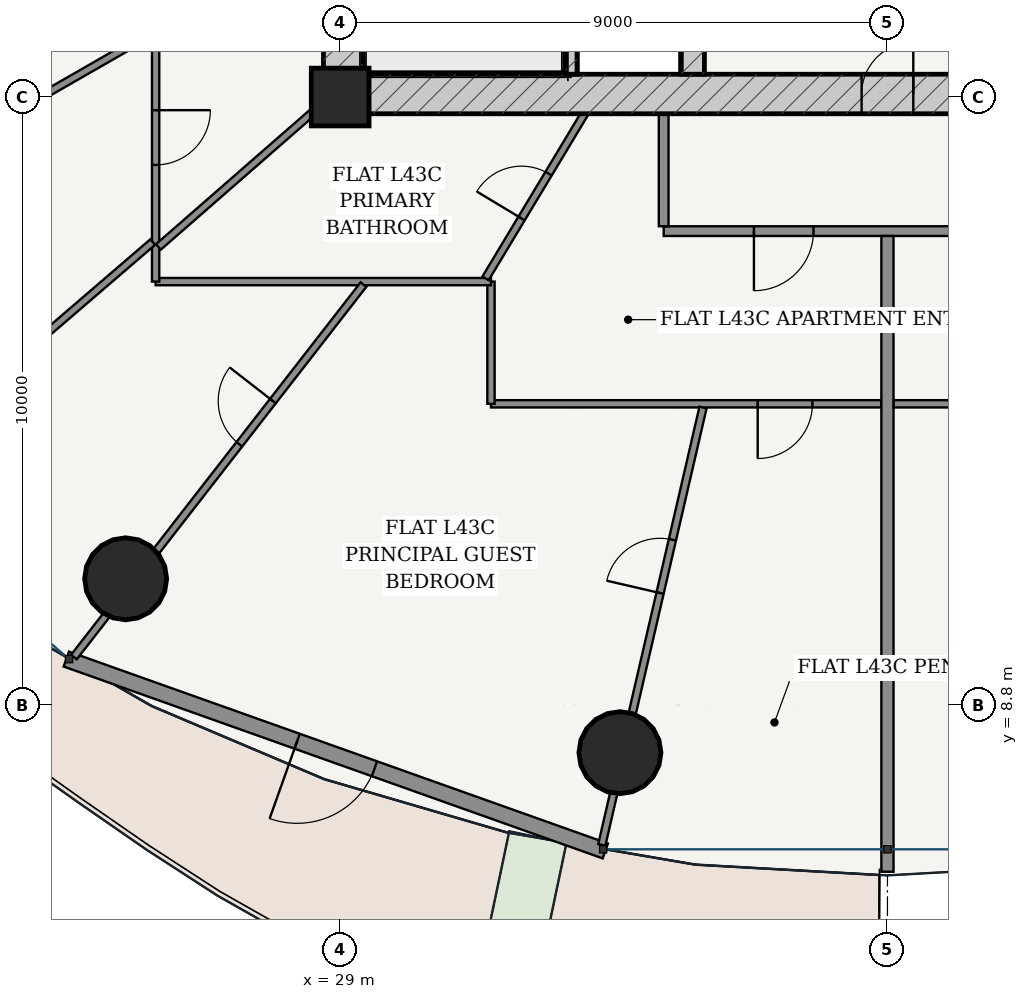
"""IFC4 building model, lengths in metres.
Left out: names, types, materials, properties, quantities, classifications, styles, units other than length and angle.
Written with IfcOpenShell. Run it as: python <this file> out.ifc"""

import sys

from ifc_helpers import new_model, si_unit, direction, frame, frame_2d, origin, origin_2d, place, context, subcontext, project, spatial, rectangle, hollow_circle, extrude, source, transform, mapped, element, fill, save


model = new_model("IFC4")
c1 = context("Model", 3, precision=1e-05, world=origin(), true_north=direction((-0.2419218956, 0.970295726276)))
c2 = subcontext(c1, "Body", "Model", "MODEL_VIEW")
j1 = project(units=[si_unit("LENGTHUNIT", "METRE"), si_unit("PLANEANGLEUNIT", "RADIAN")], contexts=[c1])
p1 = place(None, origin())
s1 = spatial("IfcSite", under=j1, at=p1, CompositionType="ELEMENT")
p2 = place(p1, origin())
s2 = spatial("IfcBuilding", under=s1, at=p2, CompositionType="ELEMENT")
p3 = place(p2, frame((0.0, 0.0, 164.2)))
s3 = spatial("IfcBuildingStorey", under=s2, at=p3, CompositionType="ELEMENT", Elevation=164.2)
p4 = place(p3, frame((29.0, 18.8, 0.0), z_axis=(0.0, 0.0, 1.0), x_axis=(1.0, 0.0, 0.0)))
e1 = element("IfcColumn", 1, at=p4, inside=s3, PredefinedType="COLUMN", context=c2, shape_type="SweptSolid", body=[
    extrude(rectangle(XDim=0.95, YDim=0.95, at=origin_2d()), origin(), (0.0, 0.0, 1.0), 3.6),
])
p5 = place(p3, frame((28.725, 18.85, 0.0), z_axis=(0.0, 0.0, 1.0), x_axis=(1.0, 0.0, 0.0)))
e2 = element("IfcWall", 2, at=p5, inside=s3, PredefinedType="SHEAR", context=c2, shape_type="SweptSolid", body=[
    extrude(rectangle(XDim=18.55, YDim=0.65, at=frame_2d((9.275, 0.0))), origin(), (0.0, 0.0, 1.0), 3.33),
])
p6 = place(p5, frame((8.85, 0.0, 0.0)))
e3 = element("IfcOpeningElement", 3, at=p6, cuts=e2, PredefinedType="OPENING", context=c2, shape_type="SweptSolid", body=[
    extrude(rectangle(XDim=0.85, YDim=2.1, at=frame_2d((0.425, 1.05))), frame((0.0, 0.335, 0.0), z_axis=(0.0, -1.0, 0.0), x_axis=(1.0, 0.0, 0.0)), (0.0, 0.0, 1.0), 0.67),
])
p7 = place(p3, frame((29.05, 19.175, 0.0), z_axis=(0.0, 0.0, 1.0), x_axis=(0.0, 1.0, 0.0)))
e4 = element("IfcWall", 4, at=p7, inside=s3, PredefinedType="SHEAR", context=c2, shape_type="SweptSolid", body=[
    extrude(rectangle(XDim=15.25, YDim=0.65, at=frame_2d((7.625, 0.0))), origin(), (0.0, 0.0, 1.0), 3.33),
])
p8 = place(p7, frame((9.875, 0.0, 0.0)))
e5 = element("IfcOpeningElement", 5, at=p8, cuts=e4, PredefinedType="OPENING", context=c2, shape_type="SweptSolid", body=[
    extrude(rectangle(XDim=1.5, YDim=2.2, at=frame_2d((0.75, 1.1))), frame((0.0, 0.335, 0.0), z_axis=(0.0, -1.0, 0.0), x_axis=(1.0, 0.0, 0.0)), (0.0, 0.0, 1.0), 0.67),
])
p9 = place(p3, frame((32.795, 19.175, 0.0), z_axis=(0.0, 0.0, 1.0), x_axis=(0.0, 1.0, 0.0)))
e6 = element("IfcWall", 6, at=p9, inside=s3, PredefinedType="SOLIDWALL", context=c2, shape_type="SweptSolid", body=[
    extrude(rectangle(XDim=7.375, YDim=0.2, at=frame_2d((3.688, 0.0))), origin(), (0.0, 0.0, 1.0), 3.33),
])
p10 = place(p3, frame((34.8, 19.175, 0.0), z_axis=(0.0, 0.0, 1.0), x_axis=(0.0, 1.0, 0.0)))
e7 = element("IfcWall", 7, at=p10, inside=s3, PredefinedType="SHEAR", context=c2, shape_type="SweptSolid", body=[
    extrude(rectangle(XDim=15.25, YDim=0.38, at=frame_2d((7.625, 0.0))), origin(), (0.0, 0.0, 1.0), 3.33),
])
p11 = place(p10, frame((7.8, 0.0, 0.0)))
e8 = element("IfcOpeningElement", 8, at=p11, cuts=e7, PredefinedType="OPENING", context=c2, shape_type="SweptSolid", body=[
    extrude(rectangle(XDim=1.05, YDim=2.15, at=frame_2d((0.525, 1.075))), frame((0.0, 0.2, 0.0), z_axis=(0.0, -1.0, 0.0), x_axis=(1.0, 0.0, 0.0)), (0.0, 0.0, 1.0), 0.4),
])
for number, where, z_axis, x_axis in (
    (9, (25.472, 10.877, 0.0), (0.0, 0.0, 1.0), (1.0, 0.0, 0.0)),
    (10, (33.601, 8.018, 0.0), (0.0, 0.0, 1.0), (1.0, 0.0, 0.0)),
):
    element("IfcColumn", number, at=place(p3, frame(where, z_axis=z_axis, x_axis=x_axis)), inside=s3, PredefinedType="COLUMN", context=c2, shape_type="SweptSolid", body=[
        extrude(hollow_circle(Radius=0.675, WallThickness=0.042, at=origin_2d()), origin(), (0.0, 0.0, 1.0), 3.6),
    ])
p12 = place(p3, frame((24.497, 9.557, 0.0), z_axis=(0.0, 0.0, 1.0), x_axis=(0.942103604331, -0.335321932934, 0.0)))
e11 = element("IfcWall", 11, at=p12, inside=s3, PredefinedType="SOLIDWALL", context=c2, shape_type="SweptSolid", body=[
    extrude(rectangle(XDim=9.408, YDim=0.26, at=frame_2d((4.704, 0.0))), origin(), (0.0, 0.0, 1.0), 3.33),
])
p13 = place(p12, frame((4.029, 0.0, 0.0)))
e12 = element("IfcOpeningElement", 12, at=p13, cuts=e11, PredefinedType="OPENING", context=c2, shape_type="SweptSolid", body=[
    extrude(rectangle(XDim=1.35, YDim=2.2, at=frame_2d((0.675, 1.1))), frame((0.0, 0.14, 0.0), z_axis=(0.0, -1.0, 0.0), x_axis=(1.0, 0.0, 0.0)), (0.0, 0.0, 1.0), 0.28),
])
p14 = place(p3, frame((34.32, 16.595, 0.0), z_axis=(0.0, 0.0, 1.0), x_axis=(1.0, 0.0, 0.0)))
e13 = element("IfcWall", 13, at=p14, inside=s3, PredefinedType="PARTITIONING", context=c2, shape_type="SweptSolid", body=[
    extrude(rectangle(XDim=14.885, YDim=0.16, at=frame_2d((7.442, 0.0))), origin(), (0.0, 0.0, 1.0), 2.776),
])
p15 = place(p14, frame((1.484, 0.0, 0.0)))
e14 = element("IfcOpeningElement", 14, at=p15, cuts=e13, PredefinedType="OPENING", context=c2, shape_type="SweptSolid", body=[
    extrude(rectangle(XDim=0.98, YDim=2.2, at=frame_2d((0.49, 1.1))), frame((0.0, 0.09, 0.0), z_axis=(0.0, -1.0, 0.0), x_axis=(1.0, 0.0, 0.0)), (0.0, 0.0, 1.0), 0.18),
])
p16 = place(p14, frame((10.741, 0.0, 0.0)))
e15 = element("IfcOpeningElement", 15, at=p16, cuts=e13, PredefinedType="OPENING", context=c2, shape_type="SweptSolid", body=[
    extrude(rectangle(XDim=0.98, YDim=2.2, at=frame_2d((0.49, 1.1))), frame((0.0, 0.09, 0.0), z_axis=(0.0, -1.0, 0.0), x_axis=(1.0, 0.0, 0.0)), (0.0, 0.0, 1.0), 0.18),
])
p17 = place(p3, frame((34.32, 16.675, 0.0), z_axis=(0.0, 0.0, 1.0), x_axis=(0.0, 1.0, 0.0)))
e16 = element("IfcWall", 16, at=p17, inside=s3, PredefinedType="PARTITIONING", context=c2, shape_type="SweptSolid", body=[
    extrude(rectangle(XDim=1.85, YDim=0.16, at=frame_2d((0.925, 0.0))), origin(), (0.0, 0.0, 1.0), 3.33),
])
p18 = place(p3, frame((37.898, 13.755, 0.0), z_axis=(0.0, 0.0, 1.0), x_axis=(-1.0, 0.0, 0.0)))
e17 = element("IfcWall", 17, at=p18, inside=s3, PredefinedType="PARTITIONING", context=c2, shape_type="SweptSolid", body=[
    extrude(rectangle(XDim=6.418, YDim=0.12, at=frame_2d((3.209, 0.0))), origin(), (0.0, 0.0, 1.0), 2.776),
])
p19 = place(p18, frame((1.132, 0.0, 0.0)))
e18 = element("IfcOpeningElement", 18, at=p19, cuts=e17, PredefinedType="OPENING", context=c2, shape_type="SweptSolid", body=[
    extrude(rectangle(XDim=0.9, YDim=2.15, at=frame_2d((0.45, 1.075))), frame((0.0, 0.07, 0.0), z_axis=(0.0, -1.0, 0.0), x_axis=(1.0, 0.0, 0.0)), (0.0, 0.0, 1.0), 0.14),
])
p20 = place(p3, frame((31.48, 13.755, 0.0), z_axis=(0.0, 0.0, 1.0), x_axis=(0.0, 1.0, 0.0)))
e19 = element("IfcWall", 19, at=p20, inside=s3, PredefinedType="PARTITIONING", context=c2, shape_type="SweptSolid", body=[
    extrude(rectangle(XDim=2.01, YDim=0.12, at=frame_2d((1.005, 0.0))), origin(), (0.0, 0.0, 1.0), 3.005),
])
p21 = place(p3, frame((31.48, 15.765, 0.0), z_axis=(0.0, 0.0, 1.0), x_axis=(-1.0, 0.0, 0.0)))
e20 = element("IfcWall", 20, at=p21, inside=s3, PredefinedType="PARTITIONING", context=c2, shape_type="SweptSolid", body=[
    extrude(rectangle(XDim=5.515, YDim=0.12, at=frame_2d((2.757, 0.0))), origin(), (0.0, 0.0, 1.0), 2.776),
])
p22 = place(p3, frame((25.965, 15.765, 0.0), z_axis=(0.0, 0.0, 1.0), x_axis=(0.0, 1.0, 0.0)))
e21 = element("IfcWall", 21, at=p22, inside=s3, PredefinedType="PARTITIONING", context=c2, shape_type="SweptSolid", body=[
    extrude(rectangle(XDim=5.715, YDim=0.12, at=frame_2d((2.857, 0.0))), origin(), (0.0, 0.0, 1.0), 2.776),
])
p23 = place(p22, frame((1.919, 0.0, 0.0)))
e22 = element("IfcOpeningElement", 22, at=p23, cuts=e21, PredefinedType="OPENING", context=c2, shape_type="SweptSolid", body=[
    extrude(rectangle(XDim=0.9, YDim=2.15, at=frame_2d((0.45, 1.075))), frame((0.0, 0.07, 0.0), z_axis=(0.0, -1.0, 0.0), x_axis=(1.0, 0.0, 0.0)), (0.0, 0.0, 1.0), 0.14),
])
p24 = place(p3, frame((25.911, 19.857, 0.0), z_axis=(0.0, 0.0, 1.0), x_axis=(-0.867160939672, -0.498028015986, 0.0)))
e23 = element("IfcWall", 23, at=p24, inside=s3, PredefinedType="PARTITIONING", context=c2, shape_type="SweptSolid", body=[
    extrude(rectangle(XDim=9.152, YDim=0.12, at=frame_2d((4.576, 0.0))), origin(), (0.0, 0.0, 1.0), 2.776),
])
p25 = place(p24, frame((3.124, 0.0, 0.0)))
e24 = element("IfcOpeningElement", 24, at=p25, cuts=e23, PredefinedType="OPENING", context=c2, shape_type="SweptSolid", body=[
    extrude(rectangle(XDim=0.9, YDim=2.15, at=frame_2d((0.45, 1.075))), frame((0.0, 0.07, 0.0), z_axis=(0.0, -1.0, 0.0), x_axis=(1.0, 0.0, 0.0)), (0.0, 0.0, 1.0), 0.14),
])
p26 = place(p3, frame((25.918, 16.416, 0.0), z_axis=(0.0, 0.0, 1.0), x_axis=(-0.758356041353, -0.651840559142, 0.0)))
e25 = element("IfcWall", 25, at=p26, inside=s3, PredefinedType="PARTITIONING", context=c2, shape_type="SweptSolid", body=[
    extrude(rectangle(XDim=6.569, YDim=0.12, at=frame_2d((3.285, 0.0))), origin(), (0.0, 0.0, 1.0), 2.846),
])
p27 = place(p26, frame((2.834, 0.0, 0.0)))
e26 = element("IfcOpeningElement", 26, at=p27, cuts=e25, PredefinedType="OPENING", context=c2, shape_type="SweptSolid", body=[
    extrude(rectangle(XDim=0.9, YDim=2.15, at=frame_2d((0.45, 1.075))), frame((0.0, 0.07, 0.0), z_axis=(0.0, -1.0, 0.0), x_axis=(1.0, 0.0, 0.0)), (0.0, 0.0, 1.0), 0.14),
])
p28 = place(p3, frame((29.383, 15.716, 0.0), z_axis=(0.0, 0.0, 1.0), x_axis=(-0.613751061882, -0.789499609904, 0.0)))
e27 = element("IfcWall", 27, at=p28, inside=s3, PredefinedType="PARTITIONING", context=c2, shape_type="SweptSolid", body=[
    extrude(rectangle(XDim=7.758, YDim=0.12, at=frame_2d((3.879, 0.0))), origin(), (0.0, 0.0, 1.0), 2.776),
])
p29 = place(p28, frame((2.426, 0.0, 0.0)))
e28 = element("IfcOpeningElement", 28, at=p29, cuts=e27, PredefinedType="OPENING", context=c2, shape_type="SweptSolid", body=[
    extrude(rectangle(XDim=0.9, YDim=2.15, at=frame_2d((0.45, 1.075))), frame((0.0, 0.07, 0.0), z_axis=(0.0, -1.0, 0.0), x_axis=(1.0, 0.0, 0.0)), (0.0, 0.0, 1.0), 0.14),
])
p30 = place(p3, frame((34.967, 13.695, 0.0), z_axis=(0.0, 0.0, 1.0), x_axis=(-0.225458405801, -0.974252794327, 0.0)))
e29 = element("IfcWall", 29, at=p30, inside=s3, PredefinedType="PARTITIONING", context=c2, shape_type="SweptSolid", body=[
    extrude(rectangle(XDim=7.383, YDim=0.12, at=frame_2d((3.691, 0.0))), origin(), (0.0, 0.0, 1.0), 2.776),
])
p31 = place(p30, frame((2.232, 0.0, 0.0)))
e30 = element("IfcOpeningElement", 30, at=p31, cuts=e29, PredefinedType="OPENING", context=c2, shape_type="SweptSolid", body=[
    extrude(rectangle(XDim=0.9, YDim=2.15, at=frame_2d((0.45, 1.075))), frame((0.0, 0.07, 0.0), z_axis=(0.0, -1.0, 0.0), x_axis=(1.0, 0.0, 0.0)), (0.0, 0.0, 1.0), 0.14),
])
p32 = place(p3, frame((28.588, 18.585, 0.0), z_axis=(0.0, 0.0, 1.0), x_axis=(-0.753380933673, -0.657584343471, 0.0)))
e31 = element("IfcWall", 31, at=p32, inside=s3, PredefinedType="PARTITIONING", context=c2, shape_type="SweptSolid", body=[
    extrude(rectangle(XDim=3.42, YDim=0.12, at=frame_2d((1.71, 0.0))), origin(), (0.0, 0.0, 1.0), 3.005),
])
p33 = place(p3, frame((33.02, 18.525, 0.0), z_axis=(0.0, 0.0, 1.0), x_axis=(-0.515677168, -0.856782970421, 0.0)))
e32 = element("IfcWall", 32, at=p33, inside=s3, PredefinedType="PARTITIONING", context=c2, shape_type="SweptSolid", body=[
    extrude(rectangle(XDim=3.159, YDim=0.12, at=frame_2d((1.58, 0.0))), origin(), (0.0, 0.0, 1.0), 3.33),
])
p34 = place(p33, frame((1.15, 0.0, 0.0)))
e33 = element("IfcOpeningElement", 33, at=p34, cuts=e32, PredefinedType="OPENING", context=c2, shape_type="SweptSolid", body=[
    extrude(rectangle(XDim=0.86, YDim=2.15, at=frame_2d((0.43, 1.075))), frame((0.0, 0.07, 0.0), z_axis=(0.0, -1.0, 0.0), x_axis=(1.0, 0.0, 0.0)), (0.0, 0.0, 1.0), 0.14),
])
p35 = place(p3, frame((38.0, 16.515, 0.0), z_axis=(0.0, 0.0, 1.0), x_axis=(0.0, -1.0, 0.0)))
e34 = element("IfcWall", 34, at=p35, inside=s3, PredefinedType="PARTITIONING", context=c2, shape_type="SweptSolid", body=[
    extrude(rectangle(XDim=10.455, YDim=0.2, at=frame_2d((5.228, 0.0))), origin(), (0.0, 0.0, 1.0), 2.846),
])
p36 = place(p3, frame((52.045, 13.755, 0.0), z_axis=(0.0, 0.0, 1.0), x_axis=(-1.0, 0.0, 0.0)))
e35 = element("IfcWall", 35, at=p36, inside=s3, PredefinedType="PARTITIONING", context=c2, shape_type="SweptSolid", body=[
    extrude(rectangle(XDim=13.943, YDim=0.12, at=frame_2d((6.971, 0.0))), origin(), (0.0, 0.0, 1.0), 2.776),
])
p37 = place(p36, frame((5.9, 0.0, 0.0)))
e36 = element("IfcOpeningElement", 36, at=p37, cuts=e35, PredefinedType="OPENING", context=c2, shape_type="SweptSolid", body=[
    extrude(rectangle(XDim=0.9, YDim=2.15, at=frame_2d((0.45, 1.075))), frame((0.0, 0.07, 0.0), z_axis=(0.0, -1.0, 0.0), x_axis=(1.0, 0.0, 0.0)), (0.0, 0.0, 1.0), 0.14),
])
p38 = place(p36, frame((1.622, 0.0, 0.0)))
e37 = element("IfcOpeningElement", 37, at=p38, cuts=e35, PredefinedType="OPENING", context=c2, shape_type="SweptSolid", body=[
    extrude(rectangle(XDim=0.9, YDim=2.15, at=frame_2d((0.45, 1.075))), frame((0.0, 0.07, 0.0), z_axis=(0.0, -1.0, 0.0), x_axis=(1.0, 0.0, 0.0)), (0.0, 0.0, 1.0), 0.14),
])
m1 = source(origin(), c2, "Body", "SweptSolid", [
    extrude(rectangle(XDim=1.35, YDim=2.2, at=frame_2d((0.675, 1.1))), frame((0.0, 0.025, 0.0), z_axis=(0.0, -1.0, 0.0), x_axis=(1.0, 0.0, 0.0)), (0.0, 0.0, 1.0), 0.05),
])
p39 = place(p13, frame((1.35, 0.0, 0.0), z_axis=(0.0, 0.0, 1.0), x_axis=(-1.0, 0.0, 0.0)))
e38 = element("IfcDoor", 38, at=p39, inside=s3, OperationType="SINGLE_SWING_RIGHT", PredefinedType="DOOR", context=c2, shape_type="MappedRepresentation", body=[
    mapped(m1, transform((0.0, 0.0, 0.0), scale=1.0)),
])
fill(e12, e38)
m2 = source(origin(), c2, "Body", "SweptSolid", [
    extrude(rectangle(XDim=0.85, YDim=2.1, at=frame_2d((0.425, 1.05))), frame((0.0, 0.025, 0.0), z_axis=(0.0, -1.0, 0.0), x_axis=(1.0, 0.0, 0.0)), (0.0, 0.0, 1.0), 0.05),
])
p40 = place(p6, origin())
e39 = element("IfcDoor", 39, at=p40, inside=s3, OperationType="SINGLE_SWING_RIGHT", PredefinedType="DOOR", context=c2, shape_type="MappedRepresentation", body=[
    mapped(m2, transform((0.0, 0.0, 0.0), scale=1.0)),
])
fill(e3, e39)
m3 = source(origin(), c2, "Body", "SweptSolid", [
    extrude(rectangle(XDim=0.98, YDim=2.2, at=frame_2d((0.49, 1.1))), frame((0.0, 0.025, 0.0), z_axis=(0.0, -1.0, 0.0), x_axis=(1.0, 0.0, 0.0)), (0.0, 0.0, 1.0), 0.05),
])
p41 = place(p15, frame((0.98, 0.0, 0.0), z_axis=(0.0, 0.0, 1.0), x_axis=(-1.0, 0.0, 0.0)))
e40 = element("IfcDoor", 40, at=p41, inside=s3, OperationType="SINGLE_SWING_RIGHT", PredefinedType="DOOR", context=c2, shape_type="MappedRepresentation", body=[
    mapped(m3, transform((0.0, 0.0, 0.0), scale=1.0)),
])
fill(e14, e40)
m4 = source(origin(), c2, "Body", "SweptSolid", [
    extrude(rectangle(XDim=0.86, YDim=2.15, at=frame_2d((0.43, 1.075))), frame((0.0, 0.025, 0.0), z_axis=(0.0, -1.0, 0.0), x_axis=(1.0, 0.0, 0.0)), (0.0, 0.0, 1.0), 0.05),
])
p42 = place(p34, frame((0.86, 0.0, 0.0), z_axis=(0.0, 0.0, 1.0), x_axis=(-1.0, 0.0, 0.0)))
e41 = element("IfcDoor", 41, at=p42, inside=s3, OperationType="SINGLE_SWING_LEFT", PredefinedType="DOOR", context=c2, shape_type="MappedRepresentation", body=[
    mapped(m4, transform((0.0, 0.0, 0.0), scale=1.0)),
])
fill(e33, e41)
m5 = source(origin(), c2, "Body", "SweptSolid", [
    extrude(rectangle(XDim=0.9, YDim=2.15, at=frame_2d((0.45, 1.075))), frame((0.0, 0.025, 0.0), z_axis=(0.0, -1.0, 0.0), x_axis=(1.0, 0.0, 0.0)), (0.0, 0.0, 1.0), 0.05),
])
p43 = place(p19, origin())
e42 = element("IfcDoor", 42, at=p43, inside=s3, OperationType="SINGLE_SWING_RIGHT", PredefinedType="DOOR", context=c2, shape_type="MappedRepresentation", body=[
    mapped(m5, transform((0.0, 0.0, 0.0), scale=1.0)),
])
fill(e18, e42)
p44 = place(p31, frame((0.9, 0.0, 0.0), z_axis=(0.0, 0.0, 1.0), x_axis=(-1.0, 0.0, 0.0)))
e43 = element("IfcDoor", 43, at=p44, inside=s3, OperationType="SINGLE_SWING_LEFT", PredefinedType="DOOR", context=c2, shape_type="MappedRepresentation", body=[
    mapped(m5, transform((0.0, 0.0, 0.0), scale=1.0)),
])
fill(e30, e43)
p45 = place(p29, frame((0.9, 0.0, 0.0), z_axis=(0.0, 0.0, 1.0), x_axis=(-1.0, 0.0, 0.0)))
e44 = element("IfcDoor", 44, at=p45, inside=s3, OperationType="SINGLE_SWING_RIGHT", PredefinedType="DOOR", context=c2, shape_type="MappedRepresentation", body=[
    mapped(m5, transform((0.0, 0.0, 0.0), scale=1.0)),
])
fill(e28, e44)
p46 = place(p23, frame((0.9, 0.0, 0.0), z_axis=(0.0, 0.0, 1.0), x_axis=(-1.0, 0.0, 0.0)))
e45 = element("IfcDoor", 45, at=p46, inside=s3, OperationType="SINGLE_SWING_LEFT", PredefinedType="DOOR", context=c2, shape_type="MappedRepresentation", body=[
    mapped(m5, transform((0.0, 0.0, 0.0), scale=1.0)),
])
fill(e22, e45)
save(model, sys.argv[1])
